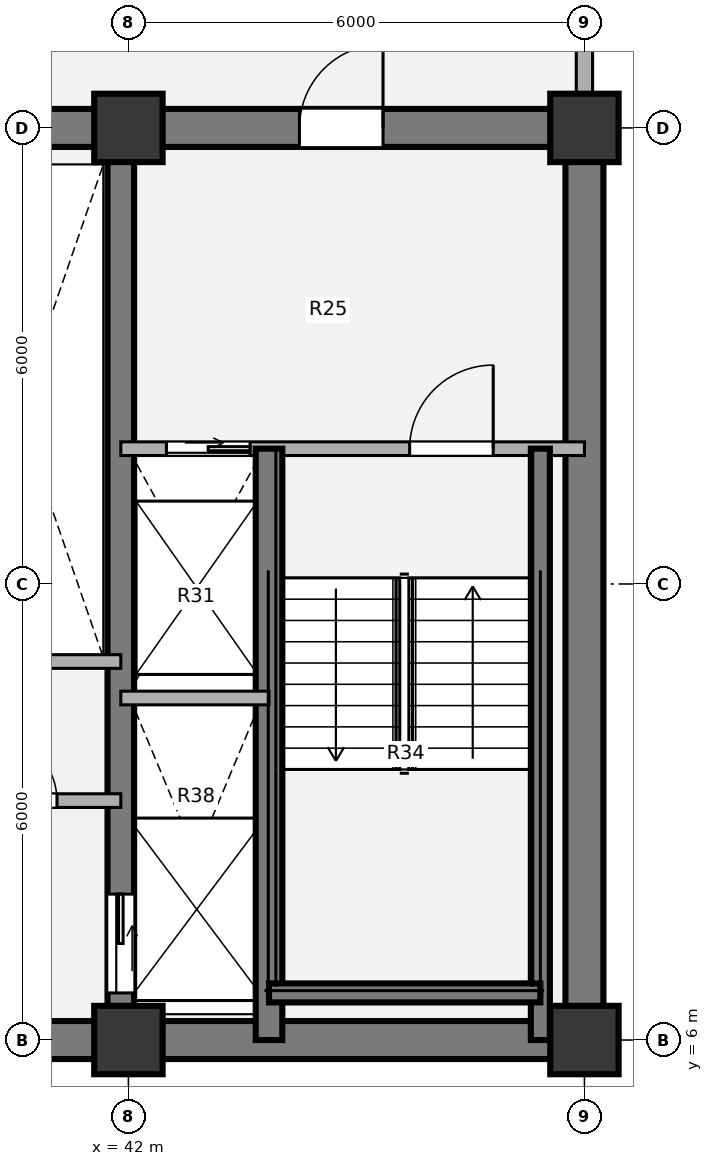
"""IFC4 building model, lengths in metres.
Left out: names, types, materials, properties, quantities, classifications, styles, units other than length and angle.
Written with IfcOpenShell. Run it as: python <this file> out.ifc"""

import sys

from ifc_helpers import new_model, si_unit, direction, frame, frame_2d, origin, origin_2d, place, context, subcontext, project, spatial, rectangle, extrude, source, transform, mapped, element, fill, save


model = new_model("IFC4")
c1 = context("Model", 3, precision=1e-05, world=origin(), true_north=direction((0.0, 1.0)))
c2 = subcontext(c1, "Body", "Model", "MODEL_VIEW")
j1 = project(units=[si_unit("LENGTHUNIT", "METRE"), si_unit("PLANEANGLEUNIT", "RADIAN")], contexts=[c1])
p1 = place(None, origin())
s1 = spatial("IfcSite", under=j1, at=p1, CompositionType="ELEMENT")
p2 = place(p1, origin())
s2 = spatial("IfcBuilding", under=s1, at=p2, CompositionType="ELEMENT")
p3 = place(p2, frame((0.0, 0.0, 93.6)))
s3 = spatial("IfcBuildingStorey", under=s2, at=p3, CompositionType="ELEMENT", Elevation=93.6)
m1 = source(origin(), c2, "Body", "SweptSolid", [
    extrude(rectangle(XDim=0.9, YDim=0.9, at=origin_2d()), origin(), (0.0, 0.0, 1.0), 3.78),
])
for number, where, z_axis, x_axis in (
    (1, (42.0, 6.0, 0.0), (0.0, 0.0, 1.0), (1.0, 0.0, 0.0)),
    (2, (48.0, 6.0, 0.0), (0.0, 0.0, 1.0), (1.0, 0.0, 0.0)),
    (3, (42.0, 18.0, 0.0), (0.0, 0.0, 1.0), (1.0, 0.0, 0.0)),
    (4, (48.0, 18.0, 0.0), (0.0, 0.0, 1.0), (1.0, 0.0, 0.0)),
):
    element("IfcColumn", number, at=place(p3, frame(where, z_axis=z_axis, x_axis=x_axis)), inside=s3, PredefinedType="COLUMN", context=c2, shape_type="MappedRepresentation", body=[
        mapped(m1, transform((0.0, 0.0, 0.0), x_axis=(1.0, 0.0, 0.0), y_axis=(0.0, 1.0, 0.0), z_axis=(0.0, 0.0, 1.0), scale=1.0)),
    ])
p4 = place(p3, frame((48.25, 6.0, 0.0), z_axis=(0.0, 0.0, 1.0), x_axis=(-1.0, 0.0, 0.0)))
e5 = element("IfcWall", 5, at=p4, inside=s3, PredefinedType="SHEAR", context=c2, shape_type="SweptSolid", body=[
    extrude(rectangle(XDim=24.5, YDim=0.5, at=frame_2d((12.25, 0.0))), origin(), (0.0, 0.0, 1.0), 3.78),
])
p5 = place(p3, frame((48.0, 18.0, 0.0), z_axis=(0.0, 0.0, 1.0), x_axis=(0.0, -1.0, 0.0)))
e6 = element("IfcWall", 6, at=p5, inside=s3, PredefinedType="SHEAR", context=c2, shape_type="SweptSolid", body=[
    extrude(rectangle(XDim=12.0, YDim=0.5, at=frame_2d((6.0, 0.0))), origin(), (0.0, 0.0, 1.0), 3.78),
])
p6 = place(p3, frame((38.8, 18.0, 0.0), z_axis=(0.0, 0.0, 1.0), x_axis=(1.0, 0.0, 0.0)))
e7 = element("IfcWall", 7, at=p6, inside=s3, PredefinedType="SHEAR", context=c2, shape_type="SweptSolid", body=[
    extrude(rectangle(XDim=9.45, YDim=0.5, at=frame_2d((4.725, 0.0))), origin(), (0.0, 0.0, 1.0), 3.78),
])
p7 = place(p6, frame((5.45, 0.0, 0.0)))
e8 = element("IfcOpeningElement", 8, at=p7, cuts=e7, PredefinedType="OPENING", context=c2, shape_type="SweptSolid", body=[
    extrude(rectangle(XDim=1.1, YDim=2.1, at=origin_2d()), frame((0.55, 0.26, 1.05), z_axis=(0.0, -1.0, 0.0), x_axis=(1.0, 0.0, 0.0)), (0.0, 0.0, 1.0), 0.52),
])
p8 = place(p3, frame((41.9, 18.0, 0.0), z_axis=(0.0, 0.0, 1.0), x_axis=(0.0, -1.0, 0.0)))
e9 = element("IfcWall", 9, at=p8, inside=s3, PredefinedType="SHEAR", context=c2, shape_type="SweptSolid", body=[
    extrude(rectangle(XDim=12.0, YDim=0.35, at=frame_2d((6.0, 0.0))), origin(), (0.0, 0.0, 1.0), 3.78),
])
p9 = place(p8, frame((10.08, 0.0, 0.0)))
e10 = element("IfcOpeningElement", 10, at=p9, cuts=e9, PredefinedType="OPENING", context=c2, shape_type="SweptSolid", body=[
    extrude(rectangle(XDim=1.3, YDim=2.1, at=origin_2d()), frame((0.65, 0.185, 1.05), z_axis=(0.0, -1.0, 0.0), x_axis=(1.0, 0.0, 0.0)), (0.0, 0.0, 1.0), 0.37),
])
p10 = place(p3, frame((48.0, 21.05, 0.0), z_axis=(0.0, 0.0, 1.0), x_axis=(0.0, -1.0, 0.0)))
e11 = element("IfcWall", 11, at=p10, inside=s3, PredefinedType="SOLIDWALL", context=c2, shape_type="SweptSolid", body=[
    extrude(rectangle(XDim=2.62, YDim=0.215, at=frame_2d((1.31, 0.0))), origin(), (0.0, 0.0, 1.0), 3.53),
])
p11 = place(p3, frame((39.35, 10.98, 0.0), z_axis=(0.0, 0.0, 1.0), x_axis=(1.0, 0.0, 0.0)))
e12 = element("IfcWall", 12, at=p11, inside=s3, PredefinedType="PARTITIONING", context=c2, shape_type="SweptSolid", body=[
    extrude(rectangle(XDim=2.55, YDim=0.18, at=frame_2d((1.275, 0.0))), origin(), (0.0, 0.0, 1.0), 3.5),
])
p12 = place(p3, frame((39.35, 9.15, 0.0), z_axis=(0.0, 0.0, 1.0), x_axis=(1.0, 0.0, 0.0)))
e13 = element("IfcWall", 13, at=p12, inside=s3, PredefinedType="PARTITIONING", context=c2, shape_type="SweptSolid", body=[
    extrude(rectangle(XDim=2.55, YDim=0.18, at=frame_2d((1.275, 0.0))), origin(), (0.0, 0.0, 1.0), 3.5),
])
p13 = place(p12, frame((0.85, 0.0, 0.0)))
e14 = element("IfcOpeningElement", 14, at=p13, cuts=e13, PredefinedType="OPENING", context=c2, shape_type="SweptSolid", body=[
    extrude(rectangle(XDim=0.86, YDim=2.1, at=origin_2d()), frame((0.43, 0.1, 1.05), z_axis=(0.0, -1.0, 0.0), x_axis=(1.0, 0.0, 0.0)), (0.0, 0.0, 1.0), 0.2),
])
p14 = place(p3, frame((41.9, 13.78, 0.0), z_axis=(0.0, 0.0, 1.0), x_axis=(1.0, 0.0, 0.0)))
e15 = element("IfcWall", 15, at=p14, inside=s3, PredefinedType="PARTITIONING", context=c2, shape_type="SweptSolid", body=[
    extrude(rectangle(XDim=6.1, YDim=0.18, at=frame_2d((3.05, 0.0))), origin(), (0.0, 0.0, 1.0), 3.5),
])
p15 = place(p14, frame((0.6, 0.0, 0.0)))
e16 = element("IfcOpeningElement", 16, at=p15, cuts=e15, PredefinedType="OPENING", context=c2, shape_type="SweptSolid", body=[
    extrude(rectangle(XDim=1.1, YDim=2.1, at=origin_2d()), frame((0.55, 0.1, 1.05), z_axis=(0.0, -1.0, 0.0), x_axis=(1.0, 0.0, 0.0)), (0.0, 0.0, 1.0), 0.2),
])
p16 = place(p14, frame((3.8, 0.0, 0.0)))
e17 = element("IfcOpeningElement", 17, at=p16, cuts=e15, PredefinedType="OPENING", context=c2, shape_type="SweptSolid", body=[
    extrude(rectangle(XDim=1.1, YDim=2.1, at=origin_2d()), frame((0.55, 0.1, 1.05), z_axis=(0.0, -1.0, 0.0), x_axis=(1.0, 0.0, 0.0)), (0.0, 0.0, 1.0), 0.2),
])
p17 = place(p3, frame((43.85, 6.0, 0.0), z_axis=(0.0, 0.0, 1.0), x_axis=(0.0, 1.0, 0.0)))
e18 = element("IfcWall", 18, at=p17, inside=s3, PredefinedType="SHEAR", context=c2, shape_type="SweptSolid", body=[
    extrude(rectangle(XDim=7.78, YDim=0.35, at=frame_2d((3.89, 0.0))), origin(), (0.0, 0.0, 1.0), 3.85),
])
p18 = place(p3, frame((47.42, 6.0, 0.0), z_axis=(0.0, 0.0, 1.0), x_axis=(0.0, 1.0, 0.0)))
e19 = element("IfcWall", 19, at=p18, inside=s3, PredefinedType="SHEAR", context=c2, shape_type="SweptSolid", body=[
    extrude(rectangle(XDim=7.78, YDim=0.25, at=frame_2d((3.89, 0.0))), origin(), (0.0, 0.0, 1.0), 3.85),
])
p19 = place(p3, frame((43.85, 6.62, 0.0), z_axis=(0.0, 0.0, 1.0), x_axis=(1.0, 0.0, 0.0)))
e20 = element("IfcWall", 20, at=p19, inside=s3, PredefinedType="SHEAR", context=c2, shape_type="SweptSolid", body=[
    extrude(rectangle(XDim=3.57, YDim=0.25, at=frame_2d((1.785, 0.0))), origin(), (0.0, 0.0, 1.0), 3.85),
])
p20 = place(p3, frame((41.9, 10.5, 0.0), z_axis=(0.0, 0.0, 1.0), x_axis=(1.0, 0.0, 0.0)))
e21 = element("IfcWall", 21, at=p20, inside=s3, PredefinedType="PARTITIONING", context=c2, shape_type="SweptSolid", body=[
    extrude(rectangle(XDim=1.95, YDim=0.18, at=frame_2d((0.975, 0.0))), origin(), (0.0, 0.0, 1.0), 3.5),
])
m2 = source(origin(), c2, "Body", "SweptSolid", [
    extrude(rectangle(XDim=0.86, YDim=2.1, at=origin_2d()), frame((0.43, 0.025, 1.05), z_axis=(0.0, -1.0, 0.0), x_axis=(1.0, 0.0, 0.0)), (0.0, 0.0, 1.0), 0.05),
])
p21 = place(p13, origin())
e22 = element("IfcDoor", 22, at=p21, inside=s3, OperationType="SINGLE_SWING_LEFT", PredefinedType="DOOR", context=c2, shape_type="MappedRepresentation", body=[
    mapped(m2, transform((0.0, 0.0, 0.0), x_axis=(1.0, 0.0, 0.0), y_axis=(0.0, 1.0, 0.0), z_axis=(0.0, 0.0, 1.0), scale=1.0)),
])
fill(e14, e22)
m3 = source(origin(), c2, "Body", "SweptSolid", [
    extrude(rectangle(XDim=1.1, YDim=2.1, at=origin_2d()), frame((0.55, 0.025, 1.05), z_axis=(0.0, -1.0, 0.0), x_axis=(1.0, 0.0, 0.0)), (0.0, 0.0, 1.0), 0.05),
])
p22 = place(p15, origin())
e23 = element("IfcDoor", 23, at=p22, inside=s3, OperationType="SLIDING_TO_RIGHT", PredefinedType="DOOR", context=c2, shape_type="MappedRepresentation", body=[
    mapped(m3, transform((0.0, 0.0, 0.0), x_axis=(1.0, 0.0, 0.0), y_axis=(0.0, 1.0, 0.0), z_axis=(0.0, 0.0, 1.0), scale=1.0)),
])
fill(e16, e23)
m4 = source(origin(), c2, "Body", "SweptSolid", [
    extrude(rectangle(XDim=1.1, YDim=2.1, at=origin_2d()), frame((0.55, 0.025, 1.05), z_axis=(0.0, -1.0, 0.0), x_axis=(1.0, 0.0, 0.0)), (0.0, 0.0, 1.0), 0.05),
])
p23 = place(p16, origin())
e24 = element("IfcDoor", 24, at=p23, inside=s3, OperationType="SINGLE_SWING_RIGHT", PredefinedType="DOOR", context=c2, shape_type="MappedRepresentation", body=[
    mapped(m4, transform((0.0, 0.0, 0.0), x_axis=(1.0, 0.0, 0.0), y_axis=(0.0, 1.0, 0.0), z_axis=(0.0, 0.0, 1.0), scale=1.0)),
])
fill(e17, e24)
m5 = source(origin(), c2, "Body", "SweptSolid", [
    extrude(rectangle(XDim=1.3, YDim=2.1, at=origin_2d()), frame((0.65, 0.025, 1.05), z_axis=(0.0, -1.0, 0.0), x_axis=(1.0, 0.0, 0.0)), (0.0, 0.0, 1.0), 0.05),
])
p24 = place(p9, origin())
e25 = element("IfcDoor", 25, at=p24, inside=s3, OperationType="SLIDING_TO_LEFT", PredefinedType="DOOR", context=c2, shape_type="MappedRepresentation", body=[
    mapped(m5, transform((0.0, 0.0, 0.0), x_axis=(1.0, 0.0, 0.0), y_axis=(0.0, 1.0, 0.0), z_axis=(0.0, 0.0, 1.0), scale=1.0)),
])
fill(e10, e25)
m6 = source(origin(), c2, "Body", "SweptSolid", [
    extrude(rectangle(XDim=1.1, YDim=2.1, at=origin_2d()), frame((0.55, 0.025, 1.05), z_axis=(0.0, -1.0, 0.0), x_axis=(1.0, 0.0, 0.0)), (0.0, 0.0, 1.0), 0.05),
])
p25 = place(p7, origin())
e26 = element("IfcDoor", 26, at=p25, inside=s3, OperationType="SINGLE_SWING_RIGHT", PredefinedType="DOOR", context=c2, shape_type="MappedRepresentation", body=[
    mapped(m6, transform((0.0, 0.0, 0.0), x_axis=(1.0, 0.0, 0.0), y_axis=(0.0, 1.0, 0.0), z_axis=(0.0, 0.0, 1.0), scale=1.0)),
])
fill(e8, e26)
save(model, sys.argv[1])
